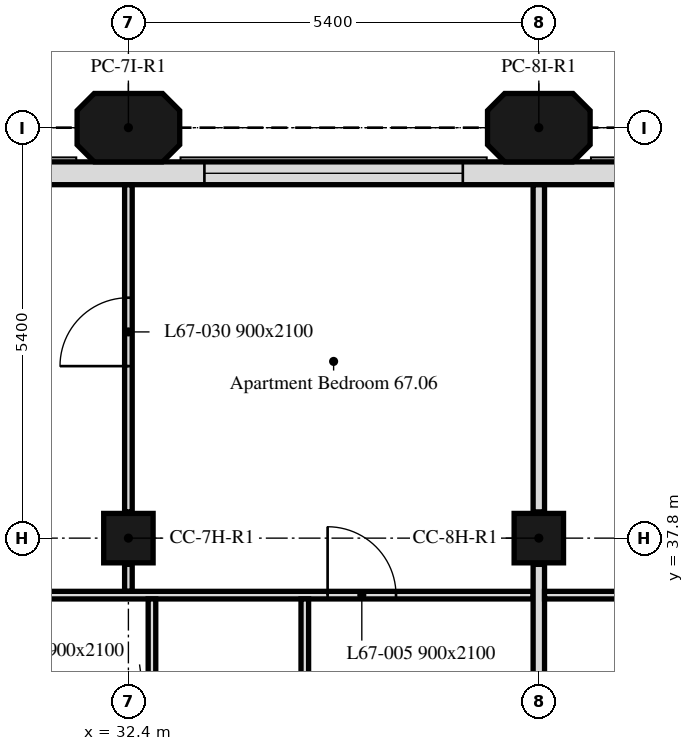
"""IFC4 building model, lengths in metres.
Left out: names, types, materials, properties, quantities, classifications, styles, units other than length and angle.
Written with IfcOpenShell. Run it as: python <this file> out.ifc"""

import sys

from ifc_helpers import new_model, si_unit, direction, frame, frame_2d, origin, origin_2d, place, context, subcontext, project, spatial, polyline, rectangle, outline, extrude, element, fill, save


model = new_model("IFC4")
c1 = context("Model", 3, precision=1e-05, world=origin(), true_north=direction((0.0, 1.0)))
c2 = subcontext(c1, "Body", "Model", "MODEL_VIEW")
j1 = project(units=[si_unit("LENGTHUNIT", "METRE"), si_unit("PLANEANGLEUNIT", "RADIAN")], contexts=[c1])
p1 = place(None, origin())
s1 = spatial("IfcSite", under=j1, at=p1, CompositionType="ELEMENT")
p2 = place(p1, origin())
s2 = spatial("IfcBuilding", under=s1, at=p2, CompositionType="ELEMENT")
p3 = place(p2, frame((0.0, 0.0, 275.2)))
s3 = spatial("IfcBuildingStorey", under=s2, at=p3, CompositionType="ELEMENT", Elevation=275.2)
for number, where, z_axis, x_axis in (
    (1, (32.4, 37.8, 0.0), (0.0, 0.0, 1.0), (1.0, 0.0, 0.0)),
    (2, (37.8, 37.8, 0.0), (0.0, 0.0, 1.0), (1.0, 0.0, 0.0)),
):
    element("IfcColumn", number, at=place(p3, frame(where, z_axis=z_axis, x_axis=x_axis)), inside=s3, PredefinedType="COLUMN", context=c2, shape_type="SweptSolid", body=[
        extrude(rectangle(XDim=0.65, YDim=0.65, at=origin_2d()), origin(), (0.0, 0.0, 1.0), 3.0),
    ])
for number, where, z_axis, x_axis in (
    (3, (32.4, 43.2, 0.0), (0.0, 0.0, 1.0), (1.0, 0.0, 0.0)),
    (4, (37.8, 43.2, 0.0), (0.0, 0.0, 1.0), (1.0, 0.0, 0.0)),
):
    element("IfcColumn", number, at=place(p3, frame(where, z_axis=z_axis, x_axis=x_axis)), inside=s3, PredefinedType="COLUMN", context=c2, shape_type="SweptSolid", body=[
        extrude(outline(polyline([(-0.45, -0.45), (0.45, -0.45), (0.675, -0.225), (0.675, 0.225), (0.45, 0.45), (-0.45, 0.45), (-0.675, 0.225), (-0.675, -0.225), (-0.45, -0.45)])), origin(), (0.0, 0.0, 1.0), 3.0),
    ])
p4 = place(p3, frame((43.014, 42.6, 0.0), z_axis=(0.0, 0.0, 1.0), x_axis=(-1.0, 0.0, 0.0)))
e5 = element("IfcWall", 5, at=p4, inside=s3, PredefinedType="SOLIDWALL", context=c2, shape_type="SweptSolid", body=[
    extrude(rectangle(XDim=32.027, YDim=0.3, at=frame_2d((16.014, 0.0))), origin(), (0.0, 0.0, 1.0), 3.0),
])
p5 = place(p4, frame((2.764, 0.0, 0.9)))
e6 = element("IfcOpeningElement", 6, at=p5, cuts=e5, PredefinedType="OPENING", context=c2, shape_type="SweptSolid", body=[
    extrude(rectangle(XDim=1.1, YDim=1.7, at=frame_2d((0.55, 0.85))), frame((0.0, 0.16, 0.0), z_axis=(0.0, -1.0, 0.0), x_axis=(1.0, 0.0, 0.0)), (0.0, 0.0, 1.0), 0.32),
])
p6 = place(p4, frame((6.214, 0.0, 0.9)))
e7 = element("IfcOpeningElement", 7, at=p6, cuts=e5, PredefinedType="OPENING", context=c2, shape_type="SweptSolid", body=[
    extrude(rectangle(XDim=3.4, YDim=1.7, at=frame_2d((1.7, 0.85))), frame((0.0, 0.16, 0.0), z_axis=(0.0, -1.0, 0.0), x_axis=(1.0, 0.0, 0.0)), (0.0, 0.0, 1.0), 0.32),
])
p7 = place(p4, frame((13.564, 0.0, 0.9)))
e8 = element("IfcOpeningElement", 8, at=p7, cuts=e5, PredefinedType="OPENING", context=c2, shape_type="SweptSolid", body=[
    extrude(rectangle(XDim=1.1, YDim=1.7, at=frame_2d((0.55, 0.85))), frame((0.0, 0.16, 0.0), z_axis=(0.0, -1.0, 0.0), x_axis=(1.0, 0.0, 0.0)), (0.0, 0.0, 1.0), 0.32),
])
p8 = place(p4, frame((17.014, 0.0, 0.9)))
e9 = element("IfcOpeningElement", 9, at=p8, cuts=e5, PredefinedType="OPENING", context=c2, shape_type="SweptSolid", body=[
    extrude(rectangle(XDim=3.4, YDim=1.7, at=frame_2d((1.7, 0.85))), frame((0.0, 0.16, 0.0), z_axis=(0.0, -1.0, 0.0), x_axis=(1.0, 0.0, 0.0)), (0.0, 0.0, 1.0), 0.32),
])
p9 = place(p4, frame((24.364, 0.0, 0.9)))
e10 = element("IfcOpeningElement", 10, at=p9, cuts=e5, PredefinedType="OPENING", context=c2, shape_type="SweptSolid", body=[
    extrude(rectangle(XDim=1.1, YDim=1.7, at=frame_2d((0.55, 0.85))), frame((0.0, 0.16, 0.0), z_axis=(0.0, -1.0, 0.0), x_axis=(1.0, 0.0, 0.0)), (0.0, 0.0, 1.0), 0.32),
])
p10 = place(p4, frame((27.814, 0.0, 0.9)))
e11 = element("IfcOpeningElement", 11, at=p10, cuts=e5, PredefinedType="OPENING", context=c2, shape_type="SweptSolid", body=[
    extrude(rectangle(XDim=3.4, YDim=1.7, at=frame_2d((1.7, 0.85))), frame((0.0, 0.16, 0.0), z_axis=(0.0, -1.0, 0.0), x_axis=(1.0, 0.0, 0.0)), (0.0, 0.0, 1.0), 0.32),
])
p11 = place(p3, frame((32.4, 37.1, 0.0), z_axis=(0.0, 0.0, 1.0), x_axis=(0.0, 1.0, 0.0)))
e12 = element("IfcWall", 12, at=p11, inside=s3, PredefinedType="PARTITIONING", context=c2, shape_type="SweptSolid", body=[
    extrude(rectangle(XDim=0.355, YDim=0.1, at=frame_2d((0.177, 0.0))), origin(), (0.0, 0.0, 1.0), 3.0),
])
p12 = place(p3, frame((32.4, 38.145, 0.0), z_axis=(0.0, 0.0, 1.0), x_axis=(0.0, 1.0, 0.0)))
e13 = element("IfcWall", 13, at=p12, inside=s3, PredefinedType="PARTITIONING", context=c2, shape_type="SweptSolid", body=[
    extrude(rectangle(XDim=4.304, YDim=0.1, at=frame_2d((2.152, 0.0))), origin(), (0.0, 0.0, 1.0), 3.0),
])
p13 = place(p12, frame((1.918, 0.0, 0.0)))
e14 = element("IfcOpeningElement", 14, at=p13, cuts=e13, PredefinedType="OPENING", context=c2, shape_type="SweptSolid", body=[
    extrude(rectangle(XDim=0.9, YDim=2.1, at=frame_2d((0.45, 1.05))), frame((0.0, 0.05, 0.0), z_axis=(0.0, -1.0, 0.0), x_axis=(1.0, 0.0, 0.0)), (0.0, 0.0, 1.0), 0.1),
])
p14 = place(p3, frame((27.075, 37.05, 0.0), z_axis=(0.0, 0.0, 1.0), x_axis=(1.0, 0.0, 0.0)))
e15 = element("IfcWall", 15, at=p14, inside=s3, PredefinedType="PARTITIONING", context=c2, shape_type="SweptSolid", body=[
    extrude(rectangle(XDim=10.65, YDim=0.1, at=frame_2d((5.325, 0.0))), origin(), (0.0, 0.0, 1.0), 3.0),
])
p15 = place(p14, frame((7.946, 0.0, 0.0)))
e16 = element("IfcOpeningElement", 16, at=p15, cuts=e15, PredefinedType="OPENING", context=c2, shape_type="SweptSolid", body=[
    extrude(rectangle(XDim=0.9, YDim=2.1, at=frame_2d((0.45, 1.05))), frame((0.0, 0.05, 0.0), z_axis=(0.0, -1.0, 0.0), x_axis=(1.0, 0.0, 0.0)), (0.0, 0.0, 1.0), 0.1),
])
p16 = place(p14, frame((1.46, 0.0, 0.0)))
e17 = element("IfcOpeningElement", 17, at=p16, cuts=e15, PredefinedType="OPENING", context=c2, shape_type="SweptSolid", body=[
    extrude(rectangle(XDim=0.9, YDim=2.1, at=frame_2d((0.45, 1.05))), frame((0.0, 0.05, 0.0), z_axis=(0.0, -1.0, 0.0), x_axis=(1.0, 0.0, 0.0)), (0.0, 0.0, 1.0), 0.1),
])
p17 = place(p14, frame((2.96, 0.0, 0.0)))
e18 = element("IfcOpeningElement", 18, at=p17, cuts=e15, PredefinedType="OPENING", context=c2, shape_type="SweptSolid", body=[
    extrude(rectangle(XDim=0.9, YDim=2.1, at=frame_2d((0.45, 1.05))), frame((0.0, 0.05, 0.0), z_axis=(0.0, -1.0, 0.0), x_axis=(1.0, 0.0, 0.0)), (0.0, 0.0, 1.0), 0.1),
])
p18 = place(p3, frame((37.8, 38.145, 0.0), z_axis=(0.0, 0.0, 1.0), x_axis=(0.0, 1.0, 0.0)))
e19 = element("IfcWall", 19, at=p18, inside=s3, PredefinedType="PARTITIONING", context=c2, shape_type="SweptSolid", body=[
    extrude(rectangle(XDim=4.304, YDim=0.15, at=frame_2d((2.152, 0.0))), origin(), (0.0, 0.0, 1.0), 3.0),
])
p19 = place(p3, frame((32.71, 34.275, 0.0), z_axis=(0.0, 0.0, 1.0), x_axis=(0.0, 1.0, 0.0)))
e20 = element("IfcWall", 20, at=p19, inside=s3, PredefinedType="PARTITIONING", context=c2, shape_type="SweptSolid", body=[
    extrude(rectangle(XDim=2.725, YDim=0.1, at=frame_2d((1.363, 0.0))), origin(), (0.0, 0.0, 1.0), 3.0),
])
p20 = place(p19, frame((0.25, 0.0, 0.0)))
e21 = element("IfcOpeningElement", 21, at=p20, cuts=e20, PredefinedType="OPENING", context=c2, shape_type="SweptSolid", body=[
    extrude(rectangle(XDim=0.9, YDim=2.1, at=frame_2d((0.45, 1.05))), frame((0.0, 0.05, 0.0), z_axis=(0.0, -1.0, 0.0), x_axis=(1.0, 0.0, 0.0)), (0.0, 0.0, 1.0), 0.1),
])
p21 = place(p3, frame((34.721, 34.275, 0.0), z_axis=(0.0, 0.0, 1.0), x_axis=(0.0, 1.0, 0.0)))
e22 = element("IfcWall", 22, at=p21, inside=s3, PredefinedType="PARTITIONING", context=c2, shape_type="SweptSolid", body=[
    extrude(rectangle(XDim=2.725, YDim=0.1, at=frame_2d((1.363, 0.0))), origin(), (0.0, 0.0, 1.0), 3.0),
])
p22 = place(p3, frame((37.8, 34.275, 0.0), z_axis=(0.0, 0.0, 1.0), x_axis=(0.0, 1.0, 0.0)))
e23 = element("IfcWall", 23, at=p22, inside=s3, PredefinedType="PARTITIONING", context=c2, shape_type="SweptSolid", body=[
    extrude(rectangle(XDim=3.18, YDim=0.15, at=frame_2d((1.59, 0.0))), origin(), (0.0, 0.0, 1.0), 3.0),
])
p23 = place(p3, frame((37.875, 37.05, 0.0), z_axis=(0.0, 0.0, 1.0), x_axis=(1.0, 0.0, 0.0)))
e24 = element("IfcWall", 24, at=p23, inside=s3, PredefinedType="PARTITIONING", context=c2, shape_type="SweptSolid", body=[
    extrude(rectangle(XDim=9.974, YDim=0.1, at=frame_2d((4.987, 0.0))), origin(), (0.0, 0.0, 1.0), 3.0),
])
p24 = place(p23, frame((1.519, 0.0, 0.0)))
e25 = element("IfcOpeningElement", 25, at=p24, cuts=e24, PredefinedType="OPENING", context=c2, shape_type="SweptSolid", body=[
    extrude(rectangle(XDim=0.9, YDim=2.1, at=frame_2d((0.45, 1.05))), frame((0.0, 0.05, 0.0), z_axis=(0.0, -1.0, 0.0), x_axis=(1.0, 0.0, 0.0)), (0.0, 0.0, 1.0), 0.1),
])
p25 = place(p23, frame((3.019, 0.0, 0.0)))
e26 = element("IfcOpeningElement", 26, at=p25, cuts=e24, PredefinedType="OPENING", context=c2, shape_type="SweptSolid", body=[
    extrude(rectangle(XDim=0.9, YDim=2.1, at=frame_2d((0.45, 1.05))), frame((0.0, 0.05, 0.0), z_axis=(0.0, -1.0, 0.0), x_axis=(1.0, 0.0, 0.0)), (0.0, 0.0, 1.0), 0.1),
])
p26 = place(p6, origin())
e27 = element("IfcWindow", 27, at=p26, inside=s3, PartitioningType="SINGLE_PANEL", PredefinedType="WINDOW", context=c2, shape_type="SweptSolid", body=[
    extrude(rectangle(XDim=3.4, YDim=1.7, at=frame_2d((1.7, 0.85))), frame((0.0, 0.03, 0.0), z_axis=(0.0, -1.0, 0.0), x_axis=(1.0, 0.0, 0.0)), (0.0, 0.0, 1.0), 0.06),
])
fill(e7, e27)
p27 = place(p15, origin())
e28 = element("IfcDoor", 28, at=p27, inside=s3, OperationType="SINGLE_SWING_RIGHT", PredefinedType="DOOR", context=c2, shape_type="SweptSolid", body=[
    extrude(rectangle(XDim=0.9, YDim=2.1, at=frame_2d((0.45, 1.05))), frame((0.0, 0.025, 0.0), z_axis=(0.0, -1.0, 0.0), x_axis=(1.0, 0.0, 0.0)), (0.0, 0.0, 1.0), 0.05),
])
fill(e16, e28)
p28 = place(p13, origin())
e29 = element("IfcDoor", 29, at=p28, inside=s3, OperationType="SINGLE_SWING_LEFT", PredefinedType="DOOR", context=c2, shape_type="SweptSolid", body=[
    extrude(rectangle(XDim=0.9, YDim=2.1, at=frame_2d((0.45, 1.05))), frame((0.0, 0.025, 0.0), z_axis=(0.0, -1.0, 0.0), x_axis=(1.0, 0.0, 0.0)), (0.0, 0.0, 1.0), 0.05),
])
fill(e14, e29)
save(model, sys.argv[1])
